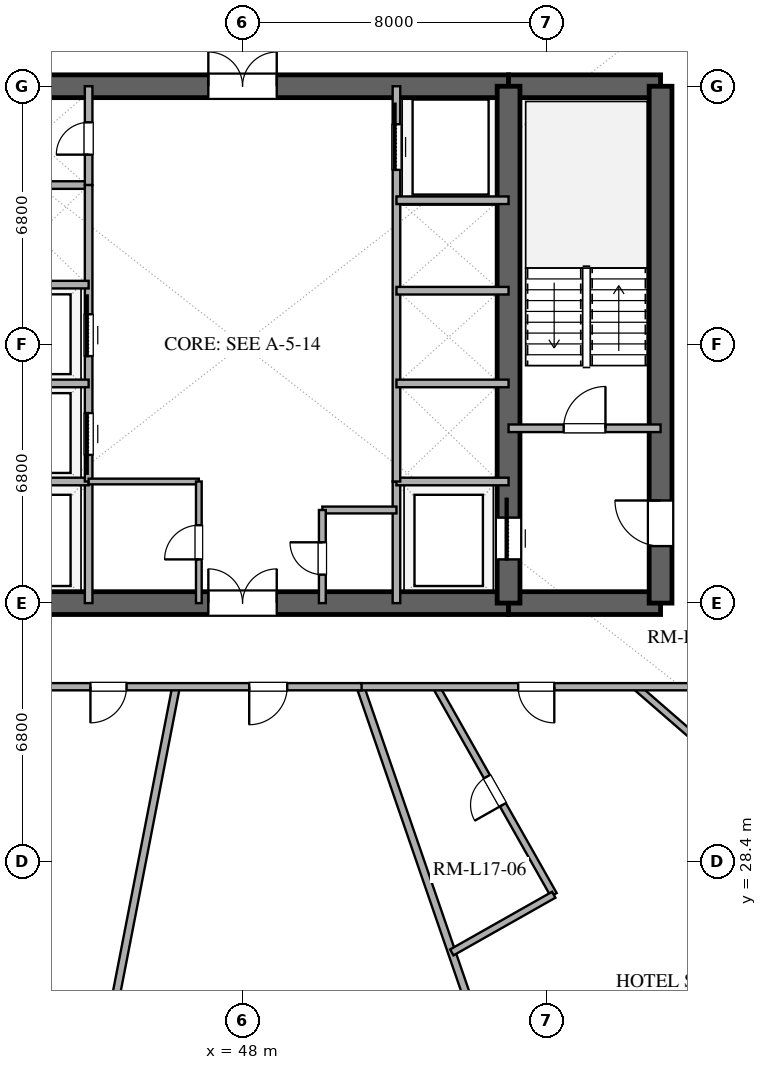
"""IFC4 building model, lengths in metres.
Left out: names, types, materials, properties, quantities, classifications, styles, units other than length and angle.
Written with IfcOpenShell. Run it as: python <this file> out.ifc"""

import sys

from ifc_helpers import new_model, si_unit, direction, frame, frame_2d, origin, place, context, subcontext, project, spatial, rectangle, extrude, element, fill, save


model = new_model("IFC4")
c1 = context("Model", 3, precision=1e-05, world=origin(), true_north=direction((0.0, 1.0)))
c2 = subcontext(c1, "Body", "Model", "MODEL_VIEW")
j1 = project(units=[si_unit("LENGTHUNIT", "METRE"), si_unit("PLANEANGLEUNIT", "RADIAN")], contexts=[c1])
p1 = place(None, origin())
s1 = spatial("IfcSite", under=j1, at=p1, CompositionType="ELEMENT")
p2 = place(p1, origin())
s2 = spatial("IfcBuilding", under=s1, at=p2, CompositionType="ELEMENT")
p3 = place(p2, frame((0.0, 0.0, 71.4)))
s3 = spatial("IfcBuildingStorey", under=s2, at=p3, CompositionType="ELEMENT", Elevation=71.4)
p4 = place(p3, frame((41.0, 35.2, 0.0), z_axis=(0.0, 0.0, 1.0), x_axis=(1.0, 0.0, 0.0)))
e1 = element("IfcWall", 1, at=p4, inside=s3, PredefinedType="SHEAR", context=c2, shape_type="SweptSolid", body=[
    extrude(rectangle(XDim=14.0, YDim=0.6, at=frame_2d((7.0, 0.0))), origin(), (0.0, 0.0, 1.0), 3.38),
])
p5 = place(p4, frame((6.1, 0.0, 0.0)))
e2 = element("IfcOpeningElement", 2, at=p5, cuts=e1, PredefinedType="OPENING", context=c2, shape_type="SweptSolid", body=[
    extrude(rectangle(XDim=1.8, YDim=2.25, at=frame_2d((0.9, 1.125))), frame((0.0, 0.31, 0.0), z_axis=(0.0, -1.0, 0.0), x_axis=(1.0, 0.0, 0.0)), (0.0, 0.0, 1.0), 0.62),
])
p6 = place(p3, frame((55.0, 35.2, 0.0), z_axis=(0.0, 0.0, 1.0), x_axis=(1.0, 0.0, 0.0)))
e3 = element("IfcWall", 3, at=p6, inside=s3, PredefinedType="SHEAR", context=c2, shape_type="SweptSolid", body=[
    extrude(rectangle(XDim=4.0, YDim=0.6, at=frame_2d((2.0, 0.0))), origin(), (0.0, 0.0, 1.0), 3.38),
])
p7 = place(p3, frame((41.0, 48.8, 0.0), z_axis=(0.0, 0.0, 1.0), x_axis=(1.0, 0.0, 0.0)))
e4 = element("IfcWall", 4, at=p7, inside=s3, PredefinedType="SHEAR", context=c2, shape_type="SweptSolid", body=[
    extrude(rectangle(XDim=14.0, YDim=0.6, at=frame_2d((7.0, 0.0))), origin(), (0.0, 0.0, 1.0), 3.38),
])
p8 = place(p7, frame((6.1, 0.0, 0.0)))
e5 = element("IfcOpeningElement", 5, at=p8, cuts=e4, PredefinedType="OPENING", context=c2, shape_type="SweptSolid", body=[
    extrude(rectangle(XDim=1.8, YDim=2.25, at=frame_2d((0.9, 1.125))), frame((0.0, 0.31, 0.0), z_axis=(0.0, -1.0, 0.0), x_axis=(1.0, 0.0, 0.0)), (0.0, 0.0, 1.0), 0.62),
])
p9 = place(p3, frame((55.0, 48.8, 0.0), z_axis=(0.0, 0.0, 1.0), x_axis=(1.0, 0.0, 0.0)))
e6 = element("IfcWall", 6, at=p9, inside=s3, PredefinedType="SHEAR", context=c2, shape_type="SweptSolid", body=[
    extrude(rectangle(XDim=4.0, YDim=0.6, at=frame_2d((2.0, 0.0))), origin(), (0.0, 0.0, 1.0), 3.38),
])
p10 = place(p3, frame((59.0, 35.2, 0.0), z_axis=(0.0, 0.0, 1.0), x_axis=(0.0, 1.0, 0.0)))
e7 = element("IfcWall", 7, at=p10, inside=s3, PredefinedType="SHEAR", context=c2, shape_type="SweptSolid", body=[
    extrude(rectangle(XDim=13.6, YDim=0.6, at=frame_2d((6.8, 0.0))), origin(), (0.0, 0.0, 1.0), 3.38),
])
p11 = place(p10, frame((1.5, 0.0, 0.0)))
e8 = element("IfcOpeningElement", 8, at=p11, cuts=e7, PredefinedType="OPENING", context=c2, shape_type="SweptSolid", body=[
    extrude(rectangle(XDim=1.2, YDim=2.15, at=frame_2d((0.6, 1.075))), frame((0.0, 0.31, 0.0), z_axis=(0.0, -1.0, 0.0), x_axis=(1.0, 0.0, 0.0)), (0.0, 0.0, 1.0), 0.62),
])
p12 = place(p3, frame((55.0, 35.2, 0.0), z_axis=(0.0, 0.0, 1.0), x_axis=(0.0, 1.0, 0.0)))
e9 = element("IfcWall", 9, at=p12, inside=s3, PredefinedType="SHEAR", context=c2, shape_type="SweptSolid", body=[
    extrude(rectangle(XDim=13.6, YDim=0.6, at=frame_2d((6.8, 0.0))), origin(), (0.0, 0.0, 1.0), 3.38),
])
p13 = place(p12, frame((1.15, 0.0, 0.0)))
e10 = element("IfcOpeningElement", 10, at=p13, cuts=e9, PredefinedType="OPENING", context=c2, shape_type="SweptSolid", body=[
    extrude(rectangle(XDim=1.1, YDim=2.2, at=frame_2d((0.55, 1.1))), frame((0.0, 0.31, 0.0), z_axis=(0.0, -1.0, 0.0), x_axis=(1.0, 0.0, 0.0)), (0.0, 0.0, 1.0), 0.62),
])
p14 = place(p3, frame((55.0, 39.8, 0.0), z_axis=(0.0, 0.0, 1.0), x_axis=(1.0, 0.0, 0.0)))
e11 = element("IfcWall", 11, at=p14, inside=s3, PredefinedType="SOLIDWALL", context=c2, shape_type="SweptSolid", body=[
    extrude(rectangle(XDim=4.0, YDim=0.2, at=frame_2d((2.0, 0.0))), origin(), (0.0, 0.0, 1.0), 2.74),
])
p15 = place(p14, frame((1.45, 0.0, 0.0)))
e12 = element("IfcOpeningElement", 12, at=p15, cuts=e11, PredefinedType="OPENING", context=c2, shape_type="SweptSolid", body=[
    extrude(rectangle(XDim=1.1, YDim=2.15, at=frame_2d((0.55, 1.075))), frame((0.0, 0.11, 0.0), z_axis=(0.0, -1.0, 0.0), x_axis=(1.0, 0.0, 0.0)), (0.0, 0.0, 1.0), 0.22),
])
p16 = place(p3, frame((43.95, 35.2, 0.0), z_axis=(0.0, 0.0, 1.0), x_axis=(0.0, 1.0, 0.0)))
e13 = element("IfcWall", 13, at=p16, inside=s3, PredefinedType="SOLIDWALL", context=c2, shape_type="SweptSolid", body=[
    extrude(rectangle(XDim=3.2, YDim=0.2, at=frame_2d((1.6, 0.0))), origin(), (0.0, 0.0, 1.0), 2.74),
])
p17 = place(p3, frame((41.0, 38.4, 0.0), z_axis=(0.0, 0.0, 1.0), x_axis=(1.0, 0.0, 0.0)))
e14 = element("IfcWall", 14, at=p17, inside=s3, PredefinedType="SOLIDWALL", context=c2, shape_type="SweptSolid", body=[
    extrude(rectangle(XDim=2.95, YDim=0.2, at=frame_2d((1.475, 0.0))), origin(), (0.0, 0.0, 1.0), 2.74),
])
p18 = place(p3, frame((52.05, 35.2, 0.0), z_axis=(0.0, 0.0, 1.0), x_axis=(0.0, 1.0, 0.0)))
e15 = element("IfcWall", 15, at=p18, inside=s3, PredefinedType="SOLIDWALL", context=c2, shape_type="SweptSolid", body=[
    extrude(rectangle(XDim=3.2, YDim=0.2, at=frame_2d((1.6, 0.0))), origin(), (0.0, 0.0, 1.0), 2.74),
])
for number, where, z_axis, x_axis in (
    (16, (52.05, 38.4, 0.0), (0.0, 0.0, 1.0), (1.0, 0.0, 0.0)),
    (17, (41.0, 46.2, 0.0), (0.0, 0.0, 1.0), (1.0, 0.0, 0.0)),
):
    element("IfcWall", number, at=place(p3, frame(where, z_axis=z_axis, x_axis=x_axis)), inside=s3, PredefinedType="SOLIDWALL", context=c2, shape_type="SweptSolid", body=[
        extrude(rectangle(XDim=2.95, YDim=0.2, at=frame_2d((1.475, 0.0))), origin(), (0.0, 0.0, 1.0), 2.74),
    ])
p19 = place(p3, frame((43.95, 46.2, 0.0), z_axis=(0.0, 0.0, 1.0), x_axis=(0.0, 1.0, 0.0)))
e18 = element("IfcWall", 18, at=p19, inside=s3, PredefinedType="SOLIDWALL", context=c2, shape_type="SweptSolid", body=[
    extrude(rectangle(XDim=2.6, YDim=0.2, at=frame_2d((1.3, 0.0))), origin(), (0.0, 0.0, 1.0), 2.74),
])
p20 = place(p19, frame((0.8, 0.0, 0.0)))
e19 = element("IfcOpeningElement", 19, at=p20, cuts=e18, PredefinedType="OPENING", context=c2, shape_type="SweptSolid", body=[
    extrude(rectangle(XDim=0.85, YDim=2.15, at=frame_2d((0.425, 1.075))), frame((0.0, 0.11, 0.0), z_axis=(0.0, -1.0, 0.0), x_axis=(1.0, 0.0, 0.0)), (0.0, 0.0, 1.0), 0.22),
])
p21 = place(p3, frame((43.95, 38.4, 0.0), z_axis=(0.0, 0.0, 1.0), x_axis=(0.0, 1.0, 0.0)))
e20 = element("IfcWall", 20, at=p21, inside=s3, PredefinedType="SOLIDWALL", context=c2, shape_type="SweptSolid", body=[
    extrude(rectangle(XDim=7.8, YDim=0.2, at=frame_2d((3.9, 0.0))), origin(), (0.0, 0.0, 1.0), 2.74),
])
p22 = place(p21, frame((0.7, 0.0, 0.0)))
e21 = element("IfcOpeningElement", 21, at=p22, cuts=e20, PredefinedType="OPENING", context=c2, shape_type="SweptSolid", body=[
    extrude(rectangle(XDim=1.1, YDim=2.2, at=frame_2d((0.55, 1.1))), frame((0.0, 0.11, 0.0), z_axis=(0.0, -1.0, 0.0), x_axis=(1.0, 0.0, 0.0)), (0.0, 0.0, 1.0), 0.22),
])
p23 = place(p21, frame((3.3, 0.0, 0.0)))
e22 = element("IfcOpeningElement", 22, at=p23, cuts=e20, PredefinedType="OPENING", context=c2, shape_type="SweptSolid", body=[
    extrude(rectangle(XDim=1.1, YDim=2.2, at=frame_2d((0.55, 1.1))), frame((0.0, 0.11, 0.0), z_axis=(0.0, -1.0, 0.0), x_axis=(1.0, 0.0, 0.0)), (0.0, 0.0, 1.0), 0.22),
])
for number, where, z_axis, x_axis in (
    (23, (41.0, 40.98, 0.0), (0.0, 0.0, 1.0), (1.0, 0.0, 0.0)),
    (24, (41.0, 43.58, 0.0), (0.0, 0.0, 1.0), (1.0, 0.0, 0.0)),
):
    element("IfcWall", number, at=place(p3, frame(where, z_axis=z_axis, x_axis=x_axis)), inside=s3, PredefinedType="SOLIDWALL", context=c2, shape_type="SweptSolid", body=[
        extrude(rectangle(XDim=2.95, YDim=0.2, at=frame_2d((1.475, 0.0))), origin(), (0.0, 0.0, 1.0), 2.74),
    ])
p24 = place(p3, frame((52.05, 38.4, 0.0), z_axis=(0.0, 0.0, 1.0), x_axis=(0.0, 1.0, 0.0)))
e25 = element("IfcWall", 25, at=p24, inside=s3, PredefinedType="SOLIDWALL", context=c2, shape_type="SweptSolid", body=[
    extrude(rectangle(XDim=10.4, YDim=0.2, at=frame_2d((5.2, 0.0))), origin(), (0.0, 0.0, 1.0), 2.74),
])
p25 = place(p24, frame((8.2, 0.0, 0.0)))
e26 = element("IfcOpeningElement", 26, at=p25, cuts=e25, PredefinedType="OPENING", context=c2, shape_type="SweptSolid", body=[
    extrude(rectangle(XDim=1.2, YDim=2.2, at=frame_2d((0.6, 1.1))), frame((0.0, 0.11, 0.0), z_axis=(0.0, -1.0, 0.0), x_axis=(1.0, 0.0, 0.0)), (0.0, 0.0, 1.0), 0.22),
])
for number, where, z_axis, x_axis in (
    (27, (52.05, 40.98, 0.0), (0.0, 0.0, 1.0), (1.0, 0.0, 0.0)),
    (28, (52.05, 43.42, 0.0), (0.0, 0.0, 1.0), (1.0, 0.0, 0.0)),
    (29, (52.05, 45.8, 0.0), (0.0, 0.0, 1.0), (1.0, 0.0, 0.0)),
):
    element("IfcWall", number, at=place(p3, frame(where, z_axis=z_axis, x_axis=x_axis)), inside=s3, PredefinedType="SOLIDWALL", context=c2, shape_type="SweptSolid", body=[
        extrude(rectangle(XDim=2.95, YDim=0.2, at=frame_2d((1.475, 0.0))), origin(), (0.0, 0.0, 1.0), 2.74),
    ])
p26 = place(p3, frame((43.95, 38.4, 0.0), z_axis=(0.0, 0.0, 1.0), x_axis=(1.0, 0.0, 0.0)))
e30 = element("IfcWall", 30, at=p26, inside=s3, PredefinedType="PARTITIONING", context=c2, shape_type="SweptSolid", body=[
    extrude(rectangle(XDim=2.9, YDim=0.15, at=frame_2d((1.45, 0.0))), origin(), (0.0, 0.0, 1.0), 2.74),
])
p27 = place(p3, frame((46.85, 35.2, 0.0), z_axis=(0.0, 0.0, 1.0), x_axis=(0.0, 1.0, 0.0)))
e31 = element("IfcWall", 31, at=p27, inside=s3, PredefinedType="PARTITIONING", context=c2, shape_type="SweptSolid", body=[
    extrude(rectangle(XDim=3.2, YDim=0.15, at=frame_2d((1.6, 0.0))), origin(), (0.0, 0.0, 1.0), 2.74),
])
p28 = place(p27, frame((1.15, 0.0, 0.0)))
e32 = element("IfcOpeningElement", 32, at=p28, cuts=e31, PredefinedType="OPENING", context=c2, shape_type="SweptSolid", body=[
    extrude(rectangle(XDim=0.9, YDim=2.15, at=frame_2d((0.45, 1.075))), frame((0.0, 0.085, 0.0), z_axis=(0.0, -1.0, 0.0), x_axis=(1.0, 0.0, 0.0)), (0.0, 0.0, 1.0), 0.17),
])
p29 = place(p3, frame((50.1, 37.65, 0.0), z_axis=(0.0, 0.0, 1.0), x_axis=(1.0, 0.0, 0.0)))
e33 = element("IfcWall", 33, at=p29, inside=s3, PredefinedType="PLUMBINGWALL", context=c2, shape_type="SweptSolid", body=[
    extrude(rectangle(XDim=1.95, YDim=0.18, at=frame_2d((0.975, 0.0))), origin(), (0.0, 0.0, 1.0), 2.74),
])
p30 = place(p3, frame((50.1, 35.2, 0.0), z_axis=(0.0, 0.0, 1.0), x_axis=(0.0, 1.0, 0.0)))
e34 = element("IfcWall", 34, at=p30, inside=s3, PredefinedType="PLUMBINGWALL", context=c2, shape_type="SweptSolid", body=[
    extrude(rectangle(XDim=2.45, YDim=0.18, at=frame_2d((1.225, 0.0))), origin(), (0.0, 0.0, 1.0), 2.74),
])
p31 = place(p30, frame((0.75, 0.0, 0.0)))
e35 = element("IfcOpeningElement", 35, at=p31, cuts=e34, PredefinedType="OPENING", context=c2, shape_type="SweptSolid", body=[
    extrude(rectangle(XDim=0.85, YDim=2.1, at=frame_2d((0.425, 1.05))), frame((0.0, 0.1, 0.0), z_axis=(0.0, -1.0, 0.0), x_axis=(1.0, 0.0, 0.0)), (0.0, 0.0, 1.0), 0.2),
])
p32 = place(p3, frame((43.467, 18.681, 0.0), z_axis=(0.0, 0.0, 1.0), x_axis=(0.190799326792, 0.981629062781, 0.0)))
e36 = element("IfcWall", 36, at=p32, inside=s3, PredefinedType="PARTITIONING", context=c2, shape_type="SweptSolid", body=[
    extrude(rectangle(XDim=14.587, YDim=0.2, at=frame_2d((7.293, 0.0))), origin(), (0.0, 0.0, 1.0), 2.74),
])
p33 = place(p3, frame((51.099, 33.0, 0.0), z_axis=(0.0, 0.0, 1.0), x_axis=(0.325569992405, -0.945517942741, 0.0)))
e37 = element("IfcWall", 37, at=p33, inside=s3, PredefinedType="PARTITIONING", context=c2, shape_type="SweptSolid", body=[
    extrude(rectangle(XDim=14.613, YDim=0.2, at=frame_2d((7.307, 0.0))), origin(), (0.0, 0.0, 1.0), 2.74),
])
p34 = place(p3, frame((63.549, 28.484, 0.0), z_axis=(0.0, 0.0, 1.0), x_axis=(-0.754699426586, 0.65607070923, 0.0)))
e38 = element("IfcWall", 38, at=p34, inside=s3, PredefinedType="PLUMBINGWALL", context=c2, shape_type="SweptSolid", body=[
    extrude(rectangle(XDim=6.884, YDim=0.18, at=frame_2d((3.442, 0.0))), origin(), (0.0, 0.0, 1.0), 2.74),
])
p35 = place(p3, frame((56.189, 27.527, 0.0), z_axis=(0.0, 0.0, 1.0), x_axis=(-0.492421798109, 0.870356692826, 0.0)))
e39 = element("IfcWall", 39, at=p35, inside=s3, PredefinedType="PLUMBINGWALL", context=c2, shape_type="SweptSolid", body=[
    extrude(rectangle(XDim=6.289, YDim=0.18, at=frame_2d((3.144, 0.0))), origin(), (0.0, 0.0, 1.0), 2.74),
])
p36 = place(p35, frame((2.719, 0.0, 0.0)))
e40 = element("IfcOpeningElement", 40, at=p36, cuts=e39, PredefinedType="OPENING", context=c2, shape_type="SweptSolid", body=[
    extrude(rectangle(XDim=0.85, YDim=2.1, at=frame_2d((0.425, 1.05))), frame((0.0, 0.1, 0.0), z_axis=(0.0, -1.0, 0.0), x_axis=(1.0, 0.0, 0.0)), (0.0, 0.0, 1.0), 0.2),
])
p37 = place(p3, frame((61.2, 33.0, 0.0), z_axis=(0.0, 0.0, 1.0), x_axis=(-1.0, 0.0, 0.0)))
e41 = element("IfcWall", 41, at=p37, inside=s3, PredefinedType="PARTITIONING", context=c2, shape_type="SweptSolid", body=[
    extrude(rectangle(XDim=10.135, YDim=0.19, at=frame_2d((5.067, 0.0))), origin(), (0.0, 0.0, 1.0), 2.74),
])
p38 = place(p37, frame((4.996, 0.0, 0.0)))
e42 = element("IfcOpeningElement", 42, at=p38, cuts=e41, PredefinedType="OPENING", context=c2, shape_type="SweptSolid", body=[
    extrude(rectangle(XDim=0.95, YDim=2.15, at=frame_2d((0.475, 1.075))), frame((0.0, 0.105, 0.0), z_axis=(0.0, -1.0, 0.0), x_axis=(1.0, 0.0, 0.0)), (0.0, 0.0, 1.0), 0.21),
])
p39 = place(p3, frame((51.133, 33.0, 0.0), z_axis=(0.0, 0.0, 1.0), x_axis=(-1.0, 0.0, 0.0)))
e43 = element("IfcWall", 43, at=p39, inside=s3, PredefinedType="PARTITIONING", context=c2, shape_type="SweptSolid", body=[
    extrude(rectangle(XDim=8.471, YDim=0.19, at=frame_2d((4.236, 0.0))), origin(), (0.0, 0.0, 1.0), 2.74),
])
p40 = place(p39, frame((1.957, 0.0, 0.0)))
e44 = element("IfcOpeningElement", 44, at=p40, cuts=e43, PredefinedType="OPENING", context=c2, shape_type="SweptSolid", body=[
    extrude(rectangle(XDim=1.0, YDim=2.2, at=frame_2d((0.5, 1.1))), frame((0.0, 0.105, 0.0), z_axis=(0.0, -1.0, 0.0), x_axis=(1.0, 0.0, 0.0)), (0.0, 0.0, 1.0), 0.21),
])
p41 = place(p39, frame((6.185, 0.0, 0.0)))
e45 = element("IfcOpeningElement", 45, at=p41, cuts=e43, PredefinedType="OPENING", context=c2, shape_type="SweptSolid", body=[
    extrude(rectangle(XDim=0.95, YDim=2.15, at=frame_2d((0.475, 1.075))), frame((0.0, 0.105, 0.0), z_axis=(0.0, -1.0, 0.0), x_axis=(1.0, 0.0, 0.0)), (0.0, 0.0, 1.0), 0.21),
])
p42 = place(p3, frame((53.506, 26.009, 0.0), z_axis=(0.0, 0.0, 1.0), x_axis=(0.87034589465, 0.492440883422, 0.0)))
e46 = element("IfcWall", 46, at=p42, inside=s3, PredefinedType="PLUMBINGWALL", context=c2, shape_type="SweptSolid", body=[
    extrude(rectangle(XDim=3.082, YDim=0.18, at=frame_2d((1.541, 0.0))), origin(), (0.0, 0.0, 1.0), 2.74),
])
p43 = place(p13, origin())
e47 = element("IfcDoor", 47, at=p43, inside=s3, OperationType="SLIDING_TO_RIGHT", PredefinedType="DOOR", context=c2, shape_type="SweptSolid", body=[
    extrude(rectangle(XDim=1.1, YDim=2.2, at=frame_2d((0.55, 1.1))), frame((0.0, 0.025, 0.0), z_axis=(0.0, -1.0, 0.0), x_axis=(1.0, 0.0, 0.0)), (0.0, 0.0, 1.0), 0.05),
])
fill(e10, e47)
p44 = place(p11, origin())
e48 = element("IfcDoor", 48, at=p44, inside=s3, OperationType="SINGLE_SWING_RIGHT", PredefinedType="DOOR", context=c2, shape_type="SweptSolid", body=[
    extrude(rectangle(XDim=1.2, YDim=2.15, at=frame_2d((0.6, 1.075))), frame((0.0, 0.025, 0.0), z_axis=(0.0, -1.0, 0.0), x_axis=(1.0, 0.0, 0.0)), (0.0, 0.0, 1.0), 0.05),
])
fill(e8, e48)
p45 = place(p5, origin())
e49 = element("IfcDoor", 49, at=p45, inside=s3, OperationType="DOUBLE_DOOR_SINGLE_SWING", PredefinedType="DOOR", context=c2, shape_type="SweptSolid", body=[
    extrude(rectangle(XDim=1.8, YDim=2.25, at=frame_2d((0.9, 1.125))), frame((0.0, 0.025, 0.0), z_axis=(0.0, -1.0, 0.0), x_axis=(1.0, 0.0, 0.0)), (0.0, 0.0, 1.0), 0.05),
])
fill(e2, e49)
p46 = place(p8, origin())
e50 = element("IfcDoor", 50, at=p46, inside=s3, OperationType="DOUBLE_DOOR_SINGLE_SWING", PredefinedType="DOOR", context=c2, shape_type="SweptSolid", body=[
    extrude(rectangle(XDim=1.8, YDim=2.25, at=frame_2d((0.9, 1.125))), frame((0.0, 0.025, 0.0), z_axis=(0.0, -1.0, 0.0), x_axis=(1.0, 0.0, 0.0)), (0.0, 0.0, 1.0), 0.05),
])
fill(e5, e50)
p47 = place(p15, origin())
e51 = element("IfcDoor", 51, at=p47, inside=s3, OperationType="SINGLE_SWING_RIGHT", PredefinedType="DOOR", context=c2, shape_type="SweptSolid", body=[
    extrude(rectangle(XDim=1.1, YDim=2.15, at=frame_2d((0.55, 1.075))), frame((0.0, 0.025, 0.0), z_axis=(0.0, -1.0, 0.0), x_axis=(1.0, 0.0, 0.0)), (0.0, 0.0, 1.0), 0.05),
])
fill(e12, e51)
p48 = place(p20, origin())
e52 = element("IfcDoor", 52, at=p48, inside=s3, OperationType="SINGLE_SWING_LEFT", PredefinedType="DOOR", context=c2, shape_type="SweptSolid", body=[
    extrude(rectangle(XDim=0.85, YDim=2.15, at=frame_2d((0.425, 1.075))), frame((0.0, 0.025, 0.0), z_axis=(0.0, -1.0, 0.0), x_axis=(1.0, 0.0, 0.0)), (0.0, 0.0, 1.0), 0.05),
])
fill(e19, e52)
p49 = place(p22, origin())
e53 = element("IfcDoor", 53, at=p49, inside=s3, OperationType="SLIDING_TO_LEFT", PredefinedType="DOOR", context=c2, shape_type="SweptSolid", body=[
    extrude(rectangle(XDim=1.1, YDim=2.2, at=frame_2d((0.55, 1.1))), frame((0.0, 0.025, 0.0), z_axis=(0.0, -1.0, 0.0), x_axis=(1.0, 0.0, 0.0)), (0.0, 0.0, 1.0), 0.05),
])
fill(e21, e53)
p50 = place(p23, origin())
e54 = element("IfcDoor", 54, at=p50, inside=s3, OperationType="SLIDING_TO_RIGHT", PredefinedType="DOOR", context=c2, shape_type="SweptSolid", body=[
    extrude(rectangle(XDim=1.1, YDim=2.2, at=frame_2d((0.55, 1.1))), frame((0.0, 0.025, 0.0), z_axis=(0.0, -1.0, 0.0), x_axis=(1.0, 0.0, 0.0)), (0.0, 0.0, 1.0), 0.05),
])
fill(e22, e54)
p51 = place(p25, origin())
e55 = element("IfcDoor", 55, at=p51, inside=s3, OperationType="SLIDING_TO_RIGHT", PredefinedType="DOOR", context=c2, shape_type="SweptSolid", body=[
    extrude(rectangle(XDim=1.2, YDim=2.2, at=frame_2d((0.6, 1.1))), frame((0.0, 0.025, 0.0), z_axis=(0.0, -1.0, 0.0), x_axis=(1.0, 0.0, 0.0)), (0.0, 0.0, 1.0), 0.05),
])
fill(e26, e55)
p52 = place(p28, origin())
e56 = element("IfcDoor", 56, at=p52, inside=s3, OperationType="SINGLE_SWING_LEFT", PredefinedType="DOOR", context=c2, shape_type="SweptSolid", body=[
    extrude(rectangle(XDim=0.9, YDim=2.15, at=frame_2d((0.45, 1.075))), frame((0.0, 0.025, 0.0), z_axis=(0.0, -1.0, 0.0), x_axis=(1.0, 0.0, 0.0)), (0.0, 0.0, 1.0), 0.05),
])
fill(e32, e56)
p53 = place(p31, origin())
e57 = element("IfcDoor", 57, at=p53, inside=s3, OperationType="SINGLE_SWING_RIGHT", PredefinedType="DOOR", context=c2, shape_type="SweptSolid", body=[
    extrude(rectangle(XDim=0.85, YDim=2.1, at=frame_2d((0.425, 1.05))), frame((0.0, 0.025, 0.0), z_axis=(0.0, -1.0, 0.0), x_axis=(1.0, 0.0, 0.0)), (0.0, 0.0, 1.0), 0.05),
])
fill(e35, e57)
p54 = place(p36, origin())
e58 = element("IfcDoor", 58, at=p54, inside=s3, OperationType="SINGLE_SWING_LEFT", PredefinedType="DOOR", context=c2, shape_type="SweptSolid", body=[
    extrude(rectangle(XDim=0.85, YDim=2.1, at=frame_2d((0.425, 1.05))), frame((0.0, 0.025, 0.0), z_axis=(0.0, -1.0, 0.0), x_axis=(1.0, 0.0, 0.0)), (0.0, 0.0, 1.0), 0.05),
])
fill(e40, e58)
p55 = place(p38, origin())
e59 = element("IfcDoor", 59, at=p55, inside=s3, OperationType="SINGLE_SWING_LEFT", PredefinedType="DOOR", context=c2, shape_type="SweptSolid", body=[
    extrude(rectangle(XDim=0.95, YDim=2.15, at=frame_2d((0.475, 1.075))), frame((0.0, 0.025, 0.0), z_axis=(0.0, -1.0, 0.0), x_axis=(1.0, 0.0, 0.0)), (0.0, 0.0, 1.0), 0.05),
])
fill(e42, e59)
p56 = place(p40, origin())
e60 = element("IfcDoor", 60, at=p56, inside=s3, OperationType="SINGLE_SWING_RIGHT", PredefinedType="DOOR", context=c2, shape_type="SweptSolid", body=[
    extrude(rectangle(XDim=1.0, YDim=2.2, at=frame_2d((0.5, 1.1))), frame((0.0, 0.025, 0.0), z_axis=(0.0, -1.0, 0.0), x_axis=(1.0, 0.0, 0.0)), (0.0, 0.0, 1.0), 0.05),
])
fill(e44, e60)
p57 = place(p41, origin())
e61 = element("IfcDoor", 61, at=p57, inside=s3, OperationType="SINGLE_SWING_RIGHT", PredefinedType="DOOR", context=c2, shape_type="SweptSolid", body=[
    extrude(rectangle(XDim=0.95, YDim=2.15, at=frame_2d((0.475, 1.075))), frame((0.0, 0.025, 0.0), z_axis=(0.0, -1.0, 0.0), x_axis=(1.0, 0.0, 0.0)), (0.0, 0.0, 1.0), 0.05),
])
fill(e45, e61)
save(model, sys.argv[1])
